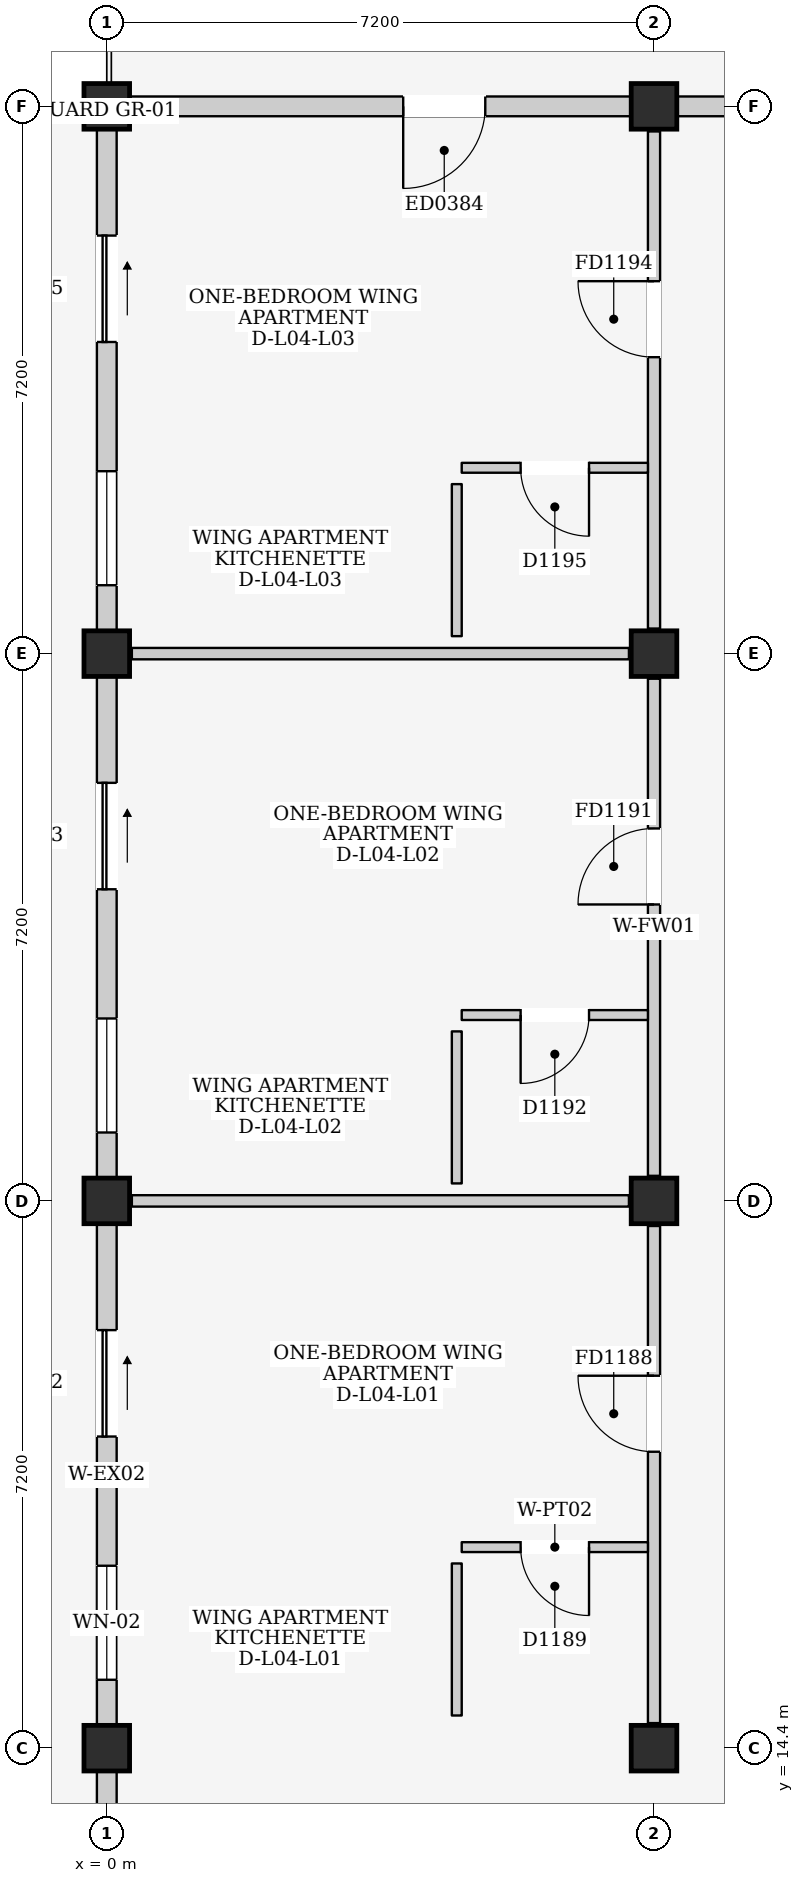
"""IFC4 building model, lengths in metres.
Left out: names, types, materials, properties, quantities, classifications, styles, units other than length and angle.
Written with IfcOpenShell. Run it as: python <this file> out.ifc"""

import sys

from ifc_helpers import new_model, si_unit, direction, frame, frame_2d, origin, origin_2d, place, context, subcontext, project, spatial, rectangle, extrude, element, fill, save


model = new_model("IFC4")
c1 = context("Model", 3, precision=1e-05, world=origin(), true_north=direction((0.0, 1.0)))
c2 = subcontext(c1, "Body", "Model", "MODEL_VIEW")
j1 = project(units=[si_unit("LENGTHUNIT", "METRE"), si_unit("PLANEANGLEUNIT", "RADIAN")], contexts=[c1])
p1 = place(None, origin())
s1 = spatial("IfcSite", under=j1, at=p1, CompositionType="ELEMENT")
p2 = place(p1, origin())
s2 = spatial("IfcBuilding", under=s1, at=p2, CompositionType="ELEMENT")
p3 = place(p2, frame((0.0, 0.0, 15.4)))
s3 = spatial("IfcBuildingStorey", under=s2, at=p3, CompositionType="ELEMENT", Elevation=15.4)
for number, where, z_axis, x_axis in (
    (1, (0.0, 14.4, 0.0), (0.0, 0.0, 1.0), (1.0, 0.0, 0.0)),
    (2, (0.0, 21.6, 0.0), (0.0, 0.0, 1.0), (1.0, 0.0, 0.0)),
    (3, (0.0, 28.8, 0.0), (0.0, 0.0, 1.0), (1.0, 0.0, 0.0)),
    (4, (0.0, 36.0, 0.0), (0.0, 0.0, 1.0), (1.0, 0.0, 0.0)),
    (5, (7.2, 14.4, 0.0), (0.0, 0.0, 1.0), (1.0, 0.0, 0.0)),
    (6, (7.2, 21.6, 0.0), (0.0, 0.0, 1.0), (1.0, 0.0, 0.0)),
    (7, (7.2, 28.8, 0.0), (0.0, 0.0, 1.0), (1.0, 0.0, 0.0)),
    (8, (7.2, 36.0, 0.0), (0.0, 0.0, 1.0), (1.0, 0.0, 0.0)),
):
    element("IfcColumn", number, at=place(p3, frame(where, z_axis=z_axis, x_axis=x_axis)), inside=s3, PredefinedType="COLUMN", context=c2, shape_type="SweptSolid", body=[
        extrude(rectangle(XDim=0.6, YDim=0.6, at=origin_2d()), origin(), (0.0, 0.0, 1.0), 3.2),
    ])
p4 = place(p3, frame((0.0, 7.5, 0.0), z_axis=(0.0, 0.0, 1.0), x_axis=(0.0, 1.0, 0.0)))
e9 = element("IfcWall", 9, at=p4, inside=s3, PredefinedType="ELEMENTEDWALL", context=c2, shape_type="SweptSolid", body=[
    extrude(rectangle(XDim=6.6, YDim=0.26, at=frame_2d((3.3, 0.0))), origin(), (0.0, 0.0, 1.0), 2.43),
])
p5 = place(p4, frame((3.65, 0.0, 0.0)))
e10 = element("IfcOpeningElement", 10, at=p5, cuts=e9, PredefinedType="OPENING", context=c2, shape_type="SweptSolid", body=[
    extrude(rectangle(XDim=1.4, YDim=2.1, at=frame_2d((0.7, 1.05))), frame((0.0, 0.145, 0.0), z_axis=(0.0, -1.0, 0.0), x_axis=(1.0, 0.0, 0.0)), (0.0, 0.0, 1.0), 0.29),
])
p6 = place(p3, frame((0.0, 14.7, 0.0), z_axis=(0.0, 0.0, 1.0), x_axis=(0.0, 1.0, 0.0)))
e11 = element("IfcWall", 11, at=p6, inside=s3, PredefinedType="ELEMENTEDWALL", context=c2, shape_type="SweptSolid", body=[
    extrude(rectangle(XDim=6.6, YDim=0.26, at=frame_2d((3.3, 0.0))), origin(), (0.0, 0.0, 1.0), 2.43),
])
p7 = place(p6, frame((3.8, 0.0, 0.0)))
e12 = element("IfcOpeningElement", 12, at=p7, cuts=e11, PredefinedType="OPENING", context=c2, shape_type="SweptSolid", body=[
    extrude(rectangle(XDim=1.4, YDim=2.1, at=frame_2d((0.7, 1.05))), frame((0.0, 0.145, 0.0), z_axis=(0.0, -1.0, 0.0), x_axis=(1.0, 0.0, 0.0)), (0.0, 0.0, 1.0), 0.29),
])
p8 = place(p6, frame((0.6, 0.0, 0.81)))
e13 = element("IfcOpeningElement", 13, at=p8, cuts=e11, PredefinedType="OPENING", context=c2, shape_type="SweptSolid", body=[
    extrude(rectangle(XDim=1.5, YDim=1.5, at=frame_2d((0.75, 0.75))), frame((0.0, 0.145, 0.0), z_axis=(0.0, -1.0, 0.0), x_axis=(1.0, 0.0, 0.0)), (0.0, 0.0, 1.0), 0.29),
])
p9 = place(p3, frame((0.0, 21.9, 0.0), z_axis=(0.0, 0.0, 1.0), x_axis=(0.0, 1.0, 0.0)))
e14 = element("IfcWall", 14, at=p9, inside=s3, PredefinedType="ELEMENTEDWALL", context=c2, shape_type="SweptSolid", body=[
    extrude(rectangle(XDim=6.6, YDim=0.26, at=frame_2d((3.3, 0.0))), origin(), (0.0, 0.0, 1.0), 2.43),
])
p10 = place(p9, frame((3.8, 0.0, 0.0)))
e15 = element("IfcOpeningElement", 15, at=p10, cuts=e14, PredefinedType="OPENING", context=c2, shape_type="SweptSolid", body=[
    extrude(rectangle(XDim=1.4, YDim=2.1, at=frame_2d((0.7, 1.05))), frame((0.0, 0.145, 0.0), z_axis=(0.0, -1.0, 0.0), x_axis=(1.0, 0.0, 0.0)), (0.0, 0.0, 1.0), 0.29),
])
p11 = place(p9, frame((0.6, 0.0, 0.81)))
e16 = element("IfcOpeningElement", 16, at=p11, cuts=e14, PredefinedType="OPENING", context=c2, shape_type="SweptSolid", body=[
    extrude(rectangle(XDim=1.5, YDim=1.5, at=frame_2d((0.75, 0.75))), frame((0.0, 0.145, 0.0), z_axis=(0.0, -1.0, 0.0), x_axis=(1.0, 0.0, 0.0)), (0.0, 0.0, 1.0), 0.29),
])
p12 = place(p3, frame((0.3, 36.0, 0.0), z_axis=(0.0, 0.0, 1.0), x_axis=(1.0, 0.0, 0.0)))
e17 = element("IfcWall", 17, at=p12, inside=s3, PredefinedType="ELEMENTEDWALL", context=c2, shape_type="SweptSolid", body=[
    extrude(rectangle(XDim=6.6, YDim=0.26, at=frame_2d((3.3, 0.0))), origin(), (0.0, 0.0, 1.0), 2.335),
])
p13 = place(p12, frame((3.6, 0.0, 0.0)))
e18 = element("IfcOpeningElement", 18, at=p13, cuts=e17, PredefinedType="OPENING", context=c2, shape_type="SweptSolid", body=[
    extrude(rectangle(XDim=1.08, YDim=2.12, at=frame_2d((0.54, 1.06))), frame((0.0, 0.145, 0.0), z_axis=(0.0, -1.0, 0.0), x_axis=(1.0, 0.0, 0.0)), (0.0, 0.0, 1.0), 0.29),
])
p14 = place(p3, frame((0.0, 29.1, 0.0), z_axis=(0.0, 0.0, 1.0), x_axis=(0.0, 1.0, 0.0)))
e19 = element("IfcWall", 19, at=p14, inside=s3, PredefinedType="ELEMENTEDWALL", context=c2, shape_type="SweptSolid", body=[
    extrude(rectangle(XDim=6.6, YDim=0.26, at=frame_2d((3.3, 0.0))), origin(), (0.0, 0.0, 1.0), 2.43),
])
p15 = place(p14, frame((3.8, 0.0, 0.0)))
e20 = element("IfcOpeningElement", 20, at=p15, cuts=e19, PredefinedType="OPENING", context=c2, shape_type="SweptSolid", body=[
    extrude(rectangle(XDim=1.4, YDim=2.1, at=frame_2d((0.7, 1.05))), frame((0.0, 0.145, 0.0), z_axis=(0.0, -1.0, 0.0), x_axis=(1.0, 0.0, 0.0)), (0.0, 0.0, 1.0), 0.29),
])
p16 = place(p14, frame((0.6, 0.0, 0.81)))
e21 = element("IfcOpeningElement", 21, at=p16, cuts=e19, PredefinedType="OPENING", context=c2, shape_type="SweptSolid", body=[
    extrude(rectangle(XDim=1.5, YDim=1.5, at=frame_2d((0.75, 0.75))), frame((0.0, 0.145, 0.0), z_axis=(0.0, -1.0, 0.0), x_axis=(1.0, 0.0, 0.0)), (0.0, 0.0, 1.0), 0.29),
])
p17 = place(p3, frame((7.5, 36.0, 0.0), z_axis=(0.0, 0.0, 1.0), x_axis=(1.0, 0.0, 0.0)))
e22 = element("IfcWall", 22, at=p17, inside=s3, PredefinedType="ELEMENTEDWALL", context=c2, shape_type="SweptSolid", body=[
    extrude(rectangle(XDim=6.6, YDim=0.26, at=frame_2d((3.3, 0.0))), origin(), (0.0, 0.0, 1.0), 2.335),
])
p18 = place(p17, frame((2.8, 0.0, 1.1)))
e23 = element("IfcOpeningElement", 23, at=p18, cuts=e22, PredefinedType="OPENING", context=c2, shape_type="SweptSolid", body=[
    extrude(rectangle(XDim=1.0, YDim=0.9, at=frame_2d((0.5, 0.45))), frame((0.0, 0.145, 0.0), z_axis=(0.0, -1.0, 0.0), x_axis=(1.0, 0.0, 0.0)), (0.0, 0.0, 1.0), 0.29),
])
p19 = place(p3, frame((7.2, 14.73, 0.0), z_axis=(0.0, 0.0, 1.0), x_axis=(0.0, 1.0, 0.0)))
e24 = element("IfcWall", 24, at=p19, inside=s3, PredefinedType="PARTITIONING", context=c2, shape_type="SweptSolid", body=[
    extrude(rectangle(XDim=6.54, YDim=0.16, at=frame_2d((3.27, 0.0))), origin(), (0.0, 0.0, 1.0), 2.385),
])
p20 = place(p19, frame((3.57, 0.0, 0.0)))
e25 = element("IfcOpeningElement", 25, at=p20, cuts=e24, PredefinedType="OPENING", context=c2, shape_type="SweptSolid", body=[
    extrude(rectangle(XDim=1.0, YDim=2.15, at=frame_2d((0.5, 1.075))), frame((0.0, 0.095, 0.0), z_axis=(0.0, -1.0, 0.0), x_axis=(1.0, 0.0, 0.0)), (0.0, 0.0, 1.0), 0.19),
])
p21 = place(p3, frame((0.33, 21.6, 0.0), z_axis=(0.0, 0.0, 1.0), x_axis=(1.0, 0.0, 0.0)))
e26 = element("IfcWall", 26, at=p21, inside=s3, PredefinedType="PARTITIONING", context=c2, shape_type="SweptSolid", body=[
    extrude(rectangle(XDim=6.54, YDim=0.15, at=frame_2d((3.27, 0.0))), origin(), (0.0, 0.0, 1.0), 2.335),
])
p22 = place(p3, frame((4.67, 17.045, 0.0), z_axis=(0.0, 0.0, 1.0), x_axis=(1.0, 0.0, 0.0)))
e27 = element("IfcWall", 27, at=p22, inside=s3, PredefinedType="PARTITIONING", context=c2, shape_type="SweptSolid", body=[
    extrude(rectangle(XDim=2.45, YDim=0.13, at=frame_2d((1.225, 0.0))), origin(), (0.0, 0.0, 1.0), 2.95),
])
p23 = place(p22, frame((0.775, 0.0, 0.0)))
e28 = element("IfcOpeningElement", 28, at=p23, cuts=e27, PredefinedType="OPENING", context=c2, shape_type="SweptSolid", body=[
    extrude(rectangle(XDim=0.9, YDim=2.1, at=frame_2d((0.45, 1.05))), frame((0.0, 0.08, 0.0), z_axis=(0.0, -1.0, 0.0), x_axis=(1.0, 0.0, 0.0)), (0.0, 0.0, 1.0), 0.16),
])
p24 = place(p3, frame((4.605, 14.83, 0.0), z_axis=(0.0, 0.0, 1.0), x_axis=(0.0, 1.0, 0.0)))
e29 = element("IfcWall", 29, at=p24, inside=s3, PredefinedType="PARTITIONING", context=c2, shape_type="SweptSolid", body=[
    extrude(rectangle(XDim=2.0, YDim=0.13, at=frame_2d((1.0, 0.0))), origin(), (0.0, 0.0, 1.0), 2.95),
])
p25 = place(p3, frame((7.2, 21.93, 0.0), z_axis=(0.0, 0.0, 1.0), x_axis=(0.0, 1.0, 0.0)))
e30 = element("IfcWall", 30, at=p25, inside=s3, PredefinedType="PARTITIONING", context=c2, shape_type="SweptSolid", body=[
    extrude(rectangle(XDim=6.54, YDim=0.16, at=frame_2d((3.27, 0.0))), origin(), (0.0, 0.0, 1.0), 2.385),
])
p26 = place(p25, frame((3.57, 0.0, 0.0)))
e31 = element("IfcOpeningElement", 31, at=p26, cuts=e30, PredefinedType="OPENING", context=c2, shape_type="SweptSolid", body=[
    extrude(rectangle(XDim=1.0, YDim=2.15, at=frame_2d((0.5, 1.075))), frame((0.0, 0.095, 0.0), z_axis=(0.0, -1.0, 0.0), x_axis=(1.0, 0.0, 0.0)), (0.0, 0.0, 1.0), 0.19),
])
p27 = place(p3, frame((0.33, 28.8, 0.0), z_axis=(0.0, 0.0, 1.0), x_axis=(1.0, 0.0, 0.0)))
e32 = element("IfcWall", 32, at=p27, inside=s3, PredefinedType="PARTITIONING", context=c2, shape_type="SweptSolid", body=[
    extrude(rectangle(XDim=6.54, YDim=0.15, at=frame_2d((3.27, 0.0))), origin(), (0.0, 0.0, 1.0), 2.335),
])
p28 = place(p3, frame((4.67, 24.045, 0.0), z_axis=(0.0, 0.0, 1.0), x_axis=(1.0, 0.0, 0.0)))
e33 = element("IfcWall", 33, at=p28, inside=s3, PredefinedType="PARTITIONING", context=c2, shape_type="SweptSolid", body=[
    extrude(rectangle(XDim=2.45, YDim=0.13, at=frame_2d((1.225, 0.0))), origin(), (0.0, 0.0, 1.0), 2.95),
])
p29 = place(p28, frame((0.775, 0.0, 0.0)))
e34 = element("IfcOpeningElement", 34, at=p29, cuts=e33, PredefinedType="OPENING", context=c2, shape_type="SweptSolid", body=[
    extrude(rectangle(XDim=0.9, YDim=2.1, at=frame_2d((0.45, 1.05))), frame((0.0, 0.08, 0.0), z_axis=(0.0, -1.0, 0.0), x_axis=(1.0, 0.0, 0.0)), (0.0, 0.0, 1.0), 0.16),
])
p30 = place(p3, frame((4.605, 21.83, 0.0), z_axis=(0.0, 0.0, 1.0), x_axis=(0.0, 1.0, 0.0)))
e35 = element("IfcWall", 35, at=p30, inside=s3, PredefinedType="PARTITIONING", context=c2, shape_type="SweptSolid", body=[
    extrude(rectangle(XDim=2.0, YDim=0.13, at=frame_2d((1.0, 0.0))), origin(), (0.0, 0.0, 1.0), 2.95),
])
p31 = place(p3, frame((7.2, 29.13, 0.0), z_axis=(0.0, 0.0, 1.0), x_axis=(0.0, 1.0, 0.0)))
e36 = element("IfcWall", 36, at=p31, inside=s3, PredefinedType="PARTITIONING", context=c2, shape_type="SweptSolid", body=[
    extrude(rectangle(XDim=6.54, YDim=0.16, at=frame_2d((3.27, 0.0))), origin(), (0.0, 0.0, 1.0), 2.385),
])
p32 = place(p31, frame((3.57, 0.0, 0.0)))
e37 = element("IfcOpeningElement", 37, at=p32, cuts=e36, PredefinedType="OPENING", context=c2, shape_type="SweptSolid", body=[
    extrude(rectangle(XDim=1.0, YDim=2.15, at=frame_2d((0.5, 1.075))), frame((0.0, 0.095, 0.0), z_axis=(0.0, -1.0, 0.0), x_axis=(1.0, 0.0, 0.0)), (0.0, 0.0, 1.0), 0.19),
])
p33 = place(p3, frame((4.67, 31.245, 0.0), z_axis=(0.0, 0.0, 1.0), x_axis=(1.0, 0.0, 0.0)))
e38 = element("IfcWall", 38, at=p33, inside=s3, PredefinedType="PARTITIONING", context=c2, shape_type="SweptSolid", body=[
    extrude(rectangle(XDim=2.45, YDim=0.13, at=frame_2d((1.225, 0.0))), origin(), (0.0, 0.0, 1.0), 2.95),
])
p34 = place(p33, frame((0.775, 0.0, 0.0)))
e39 = element("IfcOpeningElement", 39, at=p34, cuts=e38, PredefinedType="OPENING", context=c2, shape_type="SweptSolid", body=[
    extrude(rectangle(XDim=0.9, YDim=2.1, at=frame_2d((0.45, 1.05))), frame((0.0, 0.08, 0.0), z_axis=(0.0, -1.0, 0.0), x_axis=(1.0, 0.0, 0.0)), (0.0, 0.0, 1.0), 0.16),
])
p35 = place(p3, frame((4.605, 29.03, 0.0), z_axis=(0.0, 0.0, 1.0), x_axis=(0.0, 1.0, 0.0)))
e40 = element("IfcWall", 40, at=p35, inside=s3, PredefinedType="PARTITIONING", context=c2, shape_type="SweptSolid", body=[
    extrude(rectangle(XDim=2.0, YDim=0.13, at=frame_2d((1.0, 0.0))), origin(), (0.0, 0.0, 1.0), 2.95),
])
p36 = place(p7, frame((1.4, 0.0, 0.0), z_axis=(0.0, 0.0, 1.0), x_axis=(-1.0, 0.0, 0.0)))
e41 = element("IfcDoor", 41, at=p36, inside=s3, OperationType="SLIDING_TO_RIGHT", PredefinedType="DOOR", context=c2, shape_type="SweptSolid", body=[
    extrude(rectangle(XDim=1.4, YDim=2.1, at=frame_2d((0.7, 1.05))), frame((0.0, 0.025, 0.0), z_axis=(0.0, -1.0, 0.0), x_axis=(1.0, 0.0, 0.0)), (0.0, 0.0, 1.0), 0.05),
])
fill(e12, e41)
p37 = place(p8, origin())
e42 = element("IfcWindow", 42, at=p37, inside=s3, PartitioningType="DOUBLE_PANEL_VERTICAL", PredefinedType="WINDOW", context=c2, shape_type="SweptSolid", body=[
    extrude(rectangle(XDim=1.5, YDim=1.5, at=frame_2d((0.75, 0.75))), frame((0.0, 0.03, 0.0), z_axis=(0.0, -1.0, 0.0), x_axis=(1.0, 0.0, 0.0)), (0.0, 0.0, 1.0), 0.06),
])
fill(e13, e42)
p38 = place(p10, frame((1.4, 0.0, 0.0), z_axis=(0.0, 0.0, 1.0), x_axis=(-1.0, 0.0, 0.0)))
e43 = element("IfcDoor", 43, at=p38, inside=s3, OperationType="SLIDING_TO_RIGHT", PredefinedType="DOOR", context=c2, shape_type="SweptSolid", body=[
    extrude(rectangle(XDim=1.4, YDim=2.1, at=frame_2d((0.7, 1.05))), frame((0.0, 0.025, 0.0), z_axis=(0.0, -1.0, 0.0), x_axis=(1.0, 0.0, 0.0)), (0.0, 0.0, 1.0), 0.05),
])
fill(e15, e43)
p39 = place(p11, origin())
e44 = element("IfcWindow", 44, at=p39, inside=s3, PartitioningType="DOUBLE_PANEL_VERTICAL", PredefinedType="WINDOW", context=c2, shape_type="SweptSolid", body=[
    extrude(rectangle(XDim=1.5, YDim=1.5, at=frame_2d((0.75, 0.75))), frame((0.0, 0.03, 0.0), z_axis=(0.0, -1.0, 0.0), x_axis=(1.0, 0.0, 0.0)), (0.0, 0.0, 1.0), 0.06),
])
fill(e16, e44)
p40 = place(p13, frame((1.08, 0.0, 0.0), z_axis=(0.0, 0.0, 1.0), x_axis=(-1.0, 0.0, 0.0)))
e45 = element("IfcDoor", 45, at=p40, inside=s3, OperationType="SINGLE_SWING_RIGHT", PredefinedType="DOOR", context=c2, shape_type="SweptSolid", body=[
    extrude(rectangle(XDim=1.08, YDim=2.12, at=frame_2d((0.54, 1.06))), frame((0.0, 0.025, 0.0), z_axis=(0.0, -1.0, 0.0), x_axis=(1.0, 0.0, 0.0)), (0.0, 0.0, 1.0), 0.05),
])
fill(e18, e45)
p41 = place(p15, frame((1.4, 0.0, 0.0), z_axis=(0.0, 0.0, 1.0), x_axis=(-1.0, 0.0, 0.0)))
e46 = element("IfcDoor", 46, at=p41, inside=s3, OperationType="SLIDING_TO_RIGHT", PredefinedType="DOOR", context=c2, shape_type="SweptSolid", body=[
    extrude(rectangle(XDim=1.4, YDim=2.1, at=frame_2d((0.7, 1.05))), frame((0.0, 0.025, 0.0), z_axis=(0.0, -1.0, 0.0), x_axis=(1.0, 0.0, 0.0)), (0.0, 0.0, 1.0), 0.05),
])
fill(e20, e46)
p42 = place(p16, origin())
e47 = element("IfcWindow", 47, at=p42, inside=s3, PartitioningType="DOUBLE_PANEL_VERTICAL", PredefinedType="WINDOW", context=c2, shape_type="SweptSolid", body=[
    extrude(rectangle(XDim=1.5, YDim=1.5, at=frame_2d((0.75, 0.75))), frame((0.0, 0.03, 0.0), z_axis=(0.0, -1.0, 0.0), x_axis=(1.0, 0.0, 0.0)), (0.0, 0.0, 1.0), 0.06),
])
fill(e21, e47)
p43 = place(p20, origin())
e48 = element("IfcDoor", 48, at=p43, inside=s3, OperationType="SINGLE_SWING_RIGHT", PredefinedType="DOOR", context=c2, shape_type="SweptSolid", body=[
    extrude(rectangle(XDim=1.0, YDim=2.15, at=frame_2d((0.5, 1.075))), frame((0.0, 0.025, 0.0), z_axis=(0.0, -1.0, 0.0), x_axis=(1.0, 0.0, 0.0)), (0.0, 0.0, 1.0), 0.05),
])
fill(e25, e48)
p44 = place(p23, frame((0.9, 0.0, 0.0), z_axis=(0.0, 0.0, 1.0), x_axis=(-1.0, 0.0, 0.0)))
e49 = element("IfcDoor", 49, at=p44, inside=s3, OperationType="SINGLE_SWING_LEFT", PredefinedType="DOOR", context=c2, shape_type="SweptSolid", body=[
    extrude(rectangle(XDim=0.9, YDim=2.1, at=frame_2d((0.45, 1.05))), frame((0.0, 0.025, 0.0), z_axis=(0.0, -1.0, 0.0), x_axis=(1.0, 0.0, 0.0)), (0.0, 0.0, 1.0), 0.05),
])
fill(e28, e49)
p45 = place(p26, origin())
e50 = element("IfcDoor", 50, at=p45, inside=s3, OperationType="SINGLE_SWING_LEFT", PredefinedType="DOOR", context=c2, shape_type="SweptSolid", body=[
    extrude(rectangle(XDim=1.0, YDim=2.15, at=frame_2d((0.5, 1.075))), frame((0.0, 0.025, 0.0), z_axis=(0.0, -1.0, 0.0), x_axis=(1.0, 0.0, 0.0)), (0.0, 0.0, 1.0), 0.05),
])
fill(e31, e50)
p46 = place(p29, frame((0.9, 0.0, 0.0), z_axis=(0.0, 0.0, 1.0), x_axis=(-1.0, 0.0, 0.0)))
e51 = element("IfcDoor", 51, at=p46, inside=s3, OperationType="SINGLE_SWING_RIGHT", PredefinedType="DOOR", context=c2, shape_type="SweptSolid", body=[
    extrude(rectangle(XDim=0.9, YDim=2.1, at=frame_2d((0.45, 1.05))), frame((0.0, 0.025, 0.0), z_axis=(0.0, -1.0, 0.0), x_axis=(1.0, 0.0, 0.0)), (0.0, 0.0, 1.0), 0.05),
])
fill(e34, e51)
p47 = place(p32, origin())
e52 = element("IfcDoor", 52, at=p47, inside=s3, OperationType="SINGLE_SWING_RIGHT", PredefinedType="DOOR", context=c2, shape_type="SweptSolid", body=[
    extrude(rectangle(XDim=1.0, YDim=2.15, at=frame_2d((0.5, 1.075))), frame((0.0, 0.025, 0.0), z_axis=(0.0, -1.0, 0.0), x_axis=(1.0, 0.0, 0.0)), (0.0, 0.0, 1.0), 0.05),
])
fill(e37, e52)
p48 = place(p34, frame((0.9, 0.0, 0.0), z_axis=(0.0, 0.0, 1.0), x_axis=(-1.0, 0.0, 0.0)))
e53 = element("IfcDoor", 53, at=p48, inside=s3, OperationType="SINGLE_SWING_LEFT", PredefinedType="DOOR", context=c2, shape_type="SweptSolid", body=[
    extrude(rectangle(XDim=0.9, YDim=2.1, at=frame_2d((0.45, 1.05))), frame((0.0, 0.025, 0.0), z_axis=(0.0, -1.0, 0.0), x_axis=(1.0, 0.0, 0.0)), (0.0, 0.0, 1.0), 0.05),
])
fill(e39, e53)
save(model, sys.argv[1])
